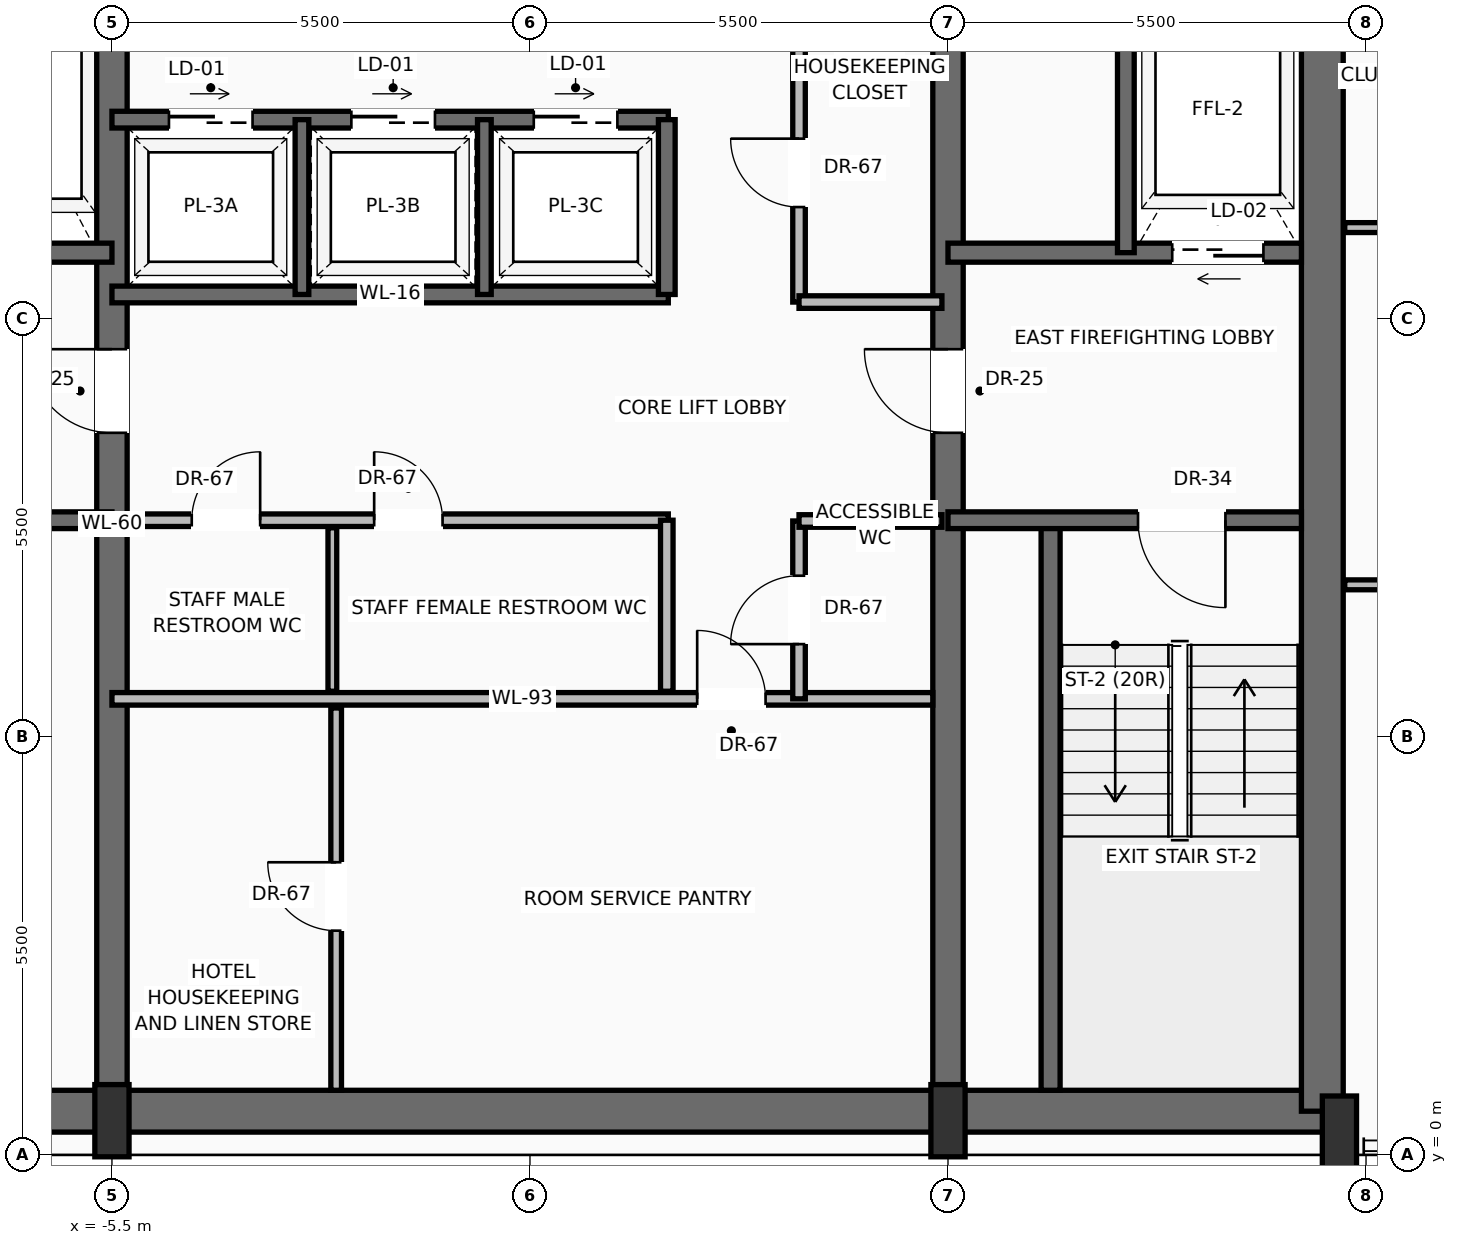
"""IFC4 building model, lengths in metres.
Left out: names, types, materials, properties, quantities, classifications, styles, units other than length and angle.
Written with IfcOpenShell. Run it as: python <this file> out.ifc"""

import sys

from ifc_helpers import new_model, si_unit, direction, frame, frame_2d, origin, origin_2d, place, context, subcontext, project, spatial, rectangle, extrude, source, transform, mapped, element, fill, save


model = new_model("IFC4")
c1 = context("Model", 3, precision=1e-05, world=origin(), true_north=direction((0.0, 1.0)))
c2 = subcontext(c1, "Body", "Model", "MODEL_VIEW")
j1 = project(units=[si_unit("LENGTHUNIT", "METRE"), si_unit("PLANEANGLEUNIT", "RADIAN")], contexts=[c1])
p1 = place(None, origin())
s1 = spatial("IfcSite", under=j1, at=p1, CompositionType="ELEMENT")
p2 = place(p1, origin())
s2 = spatial("IfcBuilding", under=s1, at=p2, CompositionType="ELEMENT")
p3 = place(p2, frame((0.0, 0.0, 233.8)))
s3 = spatial("IfcBuildingStorey", under=s2, at=p3, CompositionType="ELEMENT", Elevation=233.8)
p4 = place(p3, frame((-10.65, 0.575, 0.0), z_axis=(0.0, 0.0, 1.0), x_axis=(1.0, 0.0, 0.0)))
e1 = element("IfcWall", 1, at=p4, inside=s3, PredefinedType="SHEAR", context=c2, shape_type="SweptSolid", body=[
    extrude(rectangle(XDim=21.3, YDim=0.55, at=frame_2d((10.65, 0.0))), origin(), (0.0, 0.0, 1.0), 3.24),
])
p5 = place(p3, frame((10.425, 0.575, 0.0), z_axis=(0.0, 0.0, 1.0), x_axis=(0.0, 1.0, 0.0)))
e2 = element("IfcWall", 2, at=p5, inside=s3, PredefinedType="SHEAR", context=c2, shape_type="SweptSolid", body=[
    extrude(rectangle(XDim=15.45, YDim=0.55, at=frame_2d((7.725, 0.0))), origin(), (0.0, 0.0, 1.0), 3.24),
])
p6 = place(p3, frame((-5.5, 0.575, 0.0), z_axis=(0.0, 0.0, 1.0), x_axis=(0.0, 1.0, 0.0)))
e3 = element("IfcWall", 3, at=p6, inside=s3, PredefinedType="SHEAR", context=c2, shape_type="SweptSolid", body=[
    extrude(rectangle(XDim=15.45, YDim=0.4, at=frame_2d((7.725, 0.0))), origin(), (0.0, 0.0, 1.0), 3.24),
])
p7 = place(p6, frame((8.925, 0.0, 0.0)))
e4 = element("IfcOpeningElement", 4, at=p7, cuts=e3, PredefinedType="OPENING", context=c2, shape_type="SweptSolid", body=[
    extrude(rectangle(XDim=1.1, YDim=2.2, at=frame_2d((0.55, 1.1))), frame((0.0, 0.21, 0.0), z_axis=(0.0, -1.0, 0.0), x_axis=(1.0, 0.0, 0.0)), (0.0, 0.0, 1.0), 0.42),
])
p8 = place(p3, frame((5.5, 0.575, 0.0), z_axis=(0.0, 0.0, 1.0), x_axis=(0.0, 1.0, 0.0)))
e5 = element("IfcWall", 5, at=p8, inside=s3, PredefinedType="SHEAR", context=c2, shape_type="SweptSolid", body=[
    extrude(rectangle(XDim=15.45, YDim=0.4, at=frame_2d((7.725, 0.0))), origin(), (0.0, 0.0, 1.0), 3.24),
])
p9 = place(p8, frame((8.925, 0.0, 0.0)))
e6 = element("IfcOpeningElement", 6, at=p9, cuts=e5, PredefinedType="OPENING", context=c2, shape_type="SweptSolid", body=[
    extrude(rectangle(XDim=1.1, YDim=2.2, at=frame_2d((0.55, 1.1))), frame((0.0, 0.21, 0.0), z_axis=(0.0, -1.0, 0.0), x_axis=(1.0, 0.0, 0.0)), (0.0, 0.0, 1.0), 0.42),
])
m1 = source(origin(), c2, "Body", "SweptSolid", [
    extrude(rectangle(XDim=0.45, YDim=0.95, at=origin_2d()), origin(), (0.0, 0.0, 1.0), 3.45),
])
for number, where, z_axis, x_axis in (
    (7, (-5.5, 0.45, 0.0), (0.0, 0.0, 1.0), (1.0, 0.0, 0.0)),
    (8, (5.5, 0.45, 0.0), (0.0, 0.0, 1.0), (1.0, 0.0, 0.0)),
    (9, (10.65, 0.3, 0.0), (0.0, 0.0, 1.0), (1.0, 0.0, 0.0)),
):
    element("IfcColumn", number, at=place(p3, frame(where, z_axis=z_axis, x_axis=x_axis)), inside=s3, PredefinedType="PILASTER", context=c2, shape_type="MappedRepresentation", body=[
        mapped(m1, transform((0.0, 0.0, 0.0), scale=1.0)),
    ])
p10 = place(p3, frame((-5.5, 8.35, 0.0), z_axis=(0.0, 0.0, 1.0), x_axis=(-1.0, 0.0, 0.0)))
e10 = element("IfcWall", 10, at=p10, inside=s3, PredefinedType="SOLIDWALL", context=c2, shape_type="SweptSolid", body=[
    extrude(rectangle(XDim=4.65, YDim=0.22, at=frame_2d((2.325, 0.0))), origin(), (0.0, 0.0, 1.0), 3.24),
])
p11 = place(p10, frame((2.5, 0.0, 0.0)))
e11 = element("IfcOpeningElement", 11, at=p11, cuts=e10, PredefinedType="OPENING", context=c2, shape_type="SweptSolid", body=[
    extrude(rectangle(XDim=1.15, YDim=2.2, at=frame_2d((0.575, 1.1))), frame((0.0, 0.12, 0.0), z_axis=(0.0, -1.0, 0.0), x_axis=(1.0, 0.0, 0.0)), (0.0, 0.0, 1.0), 0.24),
])
p12 = place(p3, frame((-5.5, 11.87, 0.0), z_axis=(0.0, 0.0, 1.0), x_axis=(-1.0, 0.0, 0.0)))
e12 = element("IfcWall", 12, at=p12, inside=s3, PredefinedType="SOLIDWALL", context=c2, shape_type="SweptSolid", body=[
    extrude(rectangle(XDim=4.65, YDim=0.25, at=frame_2d((2.325, 0.0))), origin(), (0.0, 0.0, 1.0), 3.24),
])
p13 = place(p12, frame((2.95, 0.0, 0.0)))
e13 = element("IfcOpeningElement", 13, at=p13, cuts=e12, PredefinedType="OPENING", context=c2, shape_type="SweptSolid", body=[
    extrude(rectangle(XDim=1.2, YDim=2.25, at=frame_2d((0.6, 1.125))), frame((0.0, 0.135, 0.0), z_axis=(0.0, -1.0, 0.0), x_axis=(1.0, 0.0, 0.0)), (0.0, 0.0, 1.0), 0.27),
])
p14 = place(p3, frame((6.85, 0.85, 0.0), z_axis=(0.0, 0.0, 1.0), x_axis=(0.0, 1.0, 0.0)))
e14 = element("IfcWall", 14, at=p14, inside=s3, PredefinedType="SOLIDWALL", context=c2, shape_type="SweptSolid", body=[
    extrude(rectangle(XDim=7.5, YDim=0.25, at=frame_2d((3.75, 0.0))), origin(), (0.0, 0.0, 1.0), 3.24),
])
p15 = place(p3, frame((10.15, 8.35, 0.0), z_axis=(0.0, 0.0, 1.0), x_axis=(-1.0, 0.0, 0.0)))
e15 = element("IfcWall", 15, at=p15, inside=s3, PredefinedType="SOLIDWALL", context=c2, shape_type="SweptSolid", body=[
    extrude(rectangle(XDim=4.65, YDim=0.22, at=frame_2d((2.325, 0.0))), origin(), (0.0, 0.0, 1.0), 3.24),
])
p16 = place(p15, frame((1.0, 0.0, 0.0)))
e16 = element("IfcOpeningElement", 16, at=p16, cuts=e15, PredefinedType="OPENING", context=c2, shape_type="SweptSolid", body=[
    extrude(rectangle(XDim=1.15, YDim=2.2, at=frame_2d((0.575, 1.1))), frame((0.0, 0.12, 0.0), z_axis=(0.0, -1.0, 0.0), x_axis=(1.0, 0.0, 0.0)), (0.0, 0.0, 1.0), 0.24),
])
p17 = place(p3, frame((10.15, 11.87, 0.0), z_axis=(0.0, 0.0, 1.0), x_axis=(-1.0, 0.0, 0.0)))
e17 = element("IfcWall", 17, at=p17, inside=s3, PredefinedType="SOLIDWALL", context=c2, shape_type="SweptSolid", body=[
    extrude(rectangle(XDim=4.65, YDim=0.25, at=frame_2d((2.325, 0.0))), origin(), (0.0, 0.0, 1.0), 3.24),
])
p18 = place(p17, frame((0.5, 0.0, 0.0)))
e18 = element("IfcOpeningElement", 18, at=p18, cuts=e17, PredefinedType="OPENING", context=c2, shape_type="SweptSolid", body=[
    extrude(rectangle(XDim=1.2, YDim=2.25, at=frame_2d((0.6, 1.125))), frame((0.0, 0.135, 0.0), z_axis=(0.0, -1.0, 0.0), x_axis=(1.0, 0.0, 0.0)), (0.0, 0.0, 1.0), 0.27),
])
p19 = place(p3, frame((7.84, 11.87, 0.0), z_axis=(0.0, 0.0, 1.0), x_axis=(0.0, 1.0, 0.0)))
e19 = element("IfcWall", 19, at=p19, inside=s3, PredefinedType="SOLIDWALL", context=c2, shape_type="SweptSolid", body=[
    extrude(rectangle(XDim=3.88, YDim=0.22, at=frame_2d((1.94, 0.0))), origin(), (0.0, 0.0, 1.0), 3.24),
])
p20 = place(p3, frame((-5.5, 6.0, 0.0), z_axis=(0.0, 0.0, 1.0), x_axis=(1.0, 0.0, 0.0)))
e20 = element("IfcWall", 20, at=p20, inside=s3, PredefinedType="PARTITIONING", context=c2, shape_type="SweptSolid", body=[
    extrude(rectangle(XDim=10.8, YDim=0.165, at=frame_2d((5.4, 0.0))), origin(), (0.0, 0.0, 1.0), 3.232),
])
p21 = place(p20, frame((7.7, 0.0, 0.0)))
e21 = element("IfcOpeningElement", 21, at=p21, cuts=e20, PredefinedType="OPENING", context=c2, shape_type="SweptSolid", body=[
    extrude(rectangle(XDim=0.9, YDim=2.1, at=frame_2d((0.45, 1.05))), frame((0.0, 0.093, 0.0), z_axis=(0.0, -1.0, 0.0), x_axis=(1.0, 0.0, 0.0)), (0.0, 0.0, 1.0), 0.185),
])
p22 = place(p3, frame((-2.55, 0.85, 0.0), z_axis=(0.0, 0.0, 1.0), x_axis=(0.0, 1.0, 0.0)))
e22 = element("IfcWall", 22, at=p22, inside=s3, PredefinedType="PARTITIONING", context=c2, shape_type="SweptSolid", body=[
    extrude(rectangle(XDim=5.03, YDim=0.14, at=frame_2d((2.515, 0.0))), origin(), (0.0, 0.0, 1.0), 3.232),
])
p23 = place(p22, frame((2.1, 0.0, 0.0)))
e23 = element("IfcOpeningElement", 23, at=p23, cuts=e22, PredefinedType="OPENING", context=c2, shape_type="SweptSolid", body=[
    extrude(rectangle(XDim=0.9, YDim=2.1, at=frame_2d((0.45, 1.05))), frame((0.0, 0.08, 0.0), z_axis=(0.0, -1.0, 0.0), x_axis=(1.0, 0.0, 0.0)), (0.0, 0.0, 1.0), 0.16),
])
p24 = place(p3, frame((3.54, 6.0, 0.0), z_axis=(0.0, 0.0, 1.0), x_axis=(0.0, 1.0, 0.0)))
e24 = element("IfcWall", 24, at=p24, inside=s3, PredefinedType="PARTITIONING", context=c2, shape_type="SweptSolid", body=[
    extrude(rectangle(XDim=2.34, YDim=0.165, at=frame_2d((1.17, 0.0))), origin(), (0.0, 0.0, 1.0), 3.232),
])
p25 = place(p24, frame((0.72, 0.0, 0.0)))
e25 = element("IfcOpeningElement", 25, at=p25, cuts=e24, PredefinedType="OPENING", context=c2, shape_type="SweptSolid", body=[
    extrude(rectangle(XDim=0.9, YDim=2.1, at=frame_2d((0.45, 1.05))), frame((0.0, 0.093, 0.0), z_axis=(0.0, -1.0, 0.0), x_axis=(1.0, 0.0, 0.0)), (0.0, 0.0, 1.0), 0.185),
])
p26 = place(p3, frame((3.54, 8.34, 0.0), z_axis=(0.0, 0.0, 1.0), x_axis=(1.0, 0.0, 0.0)))
e26 = element("IfcWall", 26, at=p26, inside=s3, PredefinedType="PARTITIONING", context=c2, shape_type="SweptSolid", body=[
    extrude(rectangle(XDim=1.88, YDim=0.165, at=frame_2d((0.94, 0.0))), origin(), (0.0, 0.0, 1.0), 3.232),
])
p27 = place(p3, frame((-5.3, 8.35, 0.0), z_axis=(0.0, 0.0, 1.0), x_axis=(1.0, 0.0, 0.0)))
e27 = element("IfcWall", 27, at=p27, inside=s3, PredefinedType="PARTITIONING", context=c2, shape_type="SweptSolid", body=[
    extrude(rectangle(XDim=7.12, YDim=0.165, at=frame_2d((3.56, 0.0))), origin(), (0.0, 0.0, 1.0), 3.232),
])
p28 = place(p27, frame((0.85, 0.0, 0.0)))
e28 = element("IfcOpeningElement", 28, at=p28, cuts=e27, PredefinedType="OPENING", context=c2, shape_type="SweptSolid", body=[
    extrude(rectangle(XDim=0.9, YDim=2.1, at=frame_2d((0.45, 1.05))), frame((0.0, 0.093, 0.0), z_axis=(0.0, -1.0, 0.0), x_axis=(1.0, 0.0, 0.0)), (0.0, 0.0, 1.0), 0.185),
])
p29 = place(p27, frame((3.25, 0.0, 0.0)))
e29 = element("IfcOpeningElement", 29, at=p29, cuts=e27, PredefinedType="OPENING", context=c2, shape_type="SweptSolid", body=[
    extrude(rectangle(XDim=0.9, YDim=2.1, at=frame_2d((0.45, 1.05))), frame((0.0, 0.093, 0.0), z_axis=(0.0, -1.0, 0.0), x_axis=(1.0, 0.0, 0.0)), (0.0, 0.0, 1.0), 0.185),
])
p30 = place(p3, frame((1.8, 6.1, 0.0), z_axis=(0.0, 0.0, 1.0), x_axis=(0.0, 1.0, 0.0)))
e30 = element("IfcWall", 30, at=p30, inside=s3, PredefinedType="PARTITIONING", context=c2, shape_type="SweptSolid", body=[
    extrude(rectangle(XDim=2.25, YDim=0.165, at=frame_2d((1.125, 0.0))), origin(), (0.0, 0.0, 1.0), 3.232),
])
p31 = place(p3, frame((-2.6, 6.1, 0.0), z_axis=(0.0, 0.0, 1.0), x_axis=(0.0, 1.0, 0.0)))
e31 = element("IfcWall", 31, at=p31, inside=s3, PredefinedType="PARTITIONING", context=c2, shape_type="SweptSolid", body=[
    extrude(rectangle(XDim=2.15, YDim=0.115, at=frame_2d((1.075, 0.0))), origin(), (0.0, 0.0, 1.0), 3.232),
])
p32 = place(p3, frame((-5.5, 11.32, 0.0), z_axis=(0.0, 0.0, 1.0), x_axis=(1.0, 0.0, 0.0)))
e32 = element("IfcWall", 32, at=p32, inside=s3, PredefinedType="SOLIDWALL", context=c2, shape_type="SweptSolid", body=[
    extrude(rectangle(XDim=7.32, YDim=0.22, at=frame_2d((3.66, 0.0))), origin(), (0.0, 0.0, 1.0), 3.24),
])
p33 = place(p3, frame((-5.5, 13.62, 0.0), z_axis=(0.0, 0.0, 1.0), x_axis=(1.0, 0.0, 0.0)))
e33 = element("IfcWall", 33, at=p33, inside=s3, PredefinedType="SOLIDWALL", context=c2, shape_type="SweptSolid", body=[
    extrude(rectangle(XDim=7.32, YDim=0.22, at=frame_2d((3.66, 0.0))), origin(), (0.0, 0.0, 1.0), 3.24),
])
p34 = place(p33, frame((0.75, 0.0, 0.0)))
e34 = element("IfcOpeningElement", 34, at=p34, cuts=e33, PredefinedType="OPENING", context=c2, shape_type="SweptSolid", body=[
    extrude(rectangle(XDim=1.1, YDim=2.2, at=frame_2d((0.55, 1.1))), frame((0.0, 0.12, 0.0), z_axis=(0.0, -1.0, 0.0), x_axis=(1.0, 0.0, 0.0)), (0.0, 0.0, 1.0), 0.24),
])
p35 = place(p33, frame((3.15, 0.0, 0.0)))
e35 = element("IfcOpeningElement", 35, at=p35, cuts=e33, PredefinedType="OPENING", context=c2, shape_type="SweptSolid", body=[
    extrude(rectangle(XDim=1.1, YDim=2.2, at=frame_2d((0.55, 1.1))), frame((0.0, 0.12, 0.0), z_axis=(0.0, -1.0, 0.0), x_axis=(1.0, 0.0, 0.0)), (0.0, 0.0, 1.0), 0.24),
])
p36 = place(p33, frame((5.55, 0.0, 0.0)))
e36 = element("IfcOpeningElement", 36, at=p36, cuts=e33, PredefinedType="OPENING", context=c2, shape_type="SweptSolid", body=[
    extrude(rectangle(XDim=1.1, YDim=2.2, at=frame_2d((0.55, 1.1))), frame((0.0, 0.12, 0.0), z_axis=(0.0, -1.0, 0.0), x_axis=(1.0, 0.0, 0.0)), (0.0, 0.0, 1.0), 0.24),
])
p37 = place(p3, frame((1.8, 11.32, 0.0), z_axis=(0.0, 0.0, 1.0), x_axis=(0.0, 1.0, 0.0)))
e37 = element("IfcWall", 37, at=p37, inside=s3, PredefinedType="SOLIDWALL", context=c2, shape_type="SweptSolid", body=[
    extrude(rectangle(XDim=2.3, YDim=0.22, at=frame_2d((1.15, 0.0))), origin(), (0.0, 0.0, 1.0), 3.24),
])
for number, where, z_axis, x_axis in (
    (38, (-3.0, 11.32, 0.0), (0.0, 0.0, 1.0), (0.0, 1.0, 0.0)),
    (39, (-0.6, 11.32, 0.0), (0.0, 0.0, 1.0), (0.0, 1.0, 0.0)),
):
    element("IfcWall", number, at=place(p3, frame(where, z_axis=z_axis, x_axis=x_axis)), inside=s3, PredefinedType="SOLIDWALL", context=c2, shape_type="SweptSolid", body=[
        extrude(rectangle(XDim=2.3, YDim=0.18, at=frame_2d((1.15, 0.0))), origin(), (0.0, 0.0, 1.0), 3.24),
    ])
p38 = place(p3, frame((3.54, 11.22, 0.0), z_axis=(0.0, 0.0, 1.0), x_axis=(0.0, 1.0, 0.0)))
e40 = element("IfcWall", 40, at=p38, inside=s3, PredefinedType="PARTITIONING", context=c2, shape_type="SweptSolid", body=[
    extrude(rectangle(XDim=4.53, YDim=0.165, at=frame_2d((2.265, 0.0))), origin(), (0.0, 0.0, 1.0), 3.232),
])
p39 = place(p38, frame((1.25, 0.0, 0.0)))
e41 = element("IfcOpeningElement", 41, at=p39, cuts=e40, PredefinedType="OPENING", context=c2, shape_type="SweptSolid", body=[
    extrude(rectangle(XDim=0.9, YDim=2.1, at=frame_2d((0.45, 1.05))), frame((0.0, 0.093, 0.0), z_axis=(0.0, -1.0, 0.0), x_axis=(1.0, 0.0, 0.0)), (0.0, 0.0, 1.0), 0.185),
])
p40 = place(p3, frame((3.54, 11.22, 0.0), z_axis=(0.0, 0.0, 1.0), x_axis=(1.0, 0.0, 0.0)))
e42 = element("IfcWall", 42, at=p40, inside=s3, PredefinedType="PARTITIONING", context=c2, shape_type="SweptSolid", body=[
    extrude(rectangle(XDim=1.88, YDim=0.165, at=frame_2d((0.94, 0.0))), origin(), (0.0, 0.0, 1.0), 3.232),
])
p41 = place(p3, frame((10.72, 7.5, 0.0), z_axis=(0.0, 0.0, 1.0), x_axis=(1.0, 0.0, 0.0)))
e43 = element("IfcWall", 43, at=p41, inside=s3, PredefinedType="PARTITIONING", context=c2, shape_type="SweptSolid", body=[
    extrude(rectangle(XDim=13.307, YDim=0.13, at=frame_2d((6.654, 0.0))), origin(), (0.0, 0.0, 1.0), 3.232),
])
p42 = place(p41, frame((5.547, 0.0, 0.0)))
e44 = element("IfcOpeningElement", 44, at=p42, cuts=e43, PredefinedType="OPENING", context=c2, shape_type="SweptSolid", body=[
    extrude(rectangle(XDim=0.95, YDim=2.2, at=frame_2d((0.475, 1.1))), frame((0.0, 0.075, 0.0), z_axis=(0.0, -1.0, 0.0), x_axis=(1.0, 0.0, 0.0)), (0.0, 0.0, 1.0), 0.15),
])
p43 = place(p3, frame((10.72, 12.2, 0.0), z_axis=(0.0, 0.0, 1.0), x_axis=(1.0, 0.0, 0.0)))
e45 = element("IfcWall", 45, at=p43, inside=s3, PredefinedType="PARTITIONING", context=c2, shape_type="SweptSolid", body=[
    extrude(rectangle(XDim=10.394, YDim=0.13, at=frame_2d((5.197, 0.0))), origin(), (0.0, 0.0, 1.0), 3.232),
])
p44 = place(p43, frame((4.236, 0.0, 0.0)))
e46 = element("IfcOpeningElement", 46, at=p44, cuts=e45, PredefinedType="OPENING", context=c2, shape_type="SweptSolid", body=[
    extrude(rectangle(XDim=0.95, YDim=2.2, at=frame_2d((0.475, 1.1))), frame((0.0, 0.075, 0.0), z_axis=(0.0, -1.0, 0.0), x_axis=(1.0, 0.0, 0.0)), (0.0, 0.0, 1.0), 0.15),
])
m2 = source(origin(), c2, "Body", "SweptSolid", [
    extrude(rectangle(XDim=1.1, YDim=2.2, at=frame_2d((0.55, 1.1))), frame((0.0, 0.025, 0.0), z_axis=(0.0, -1.0, 0.0), x_axis=(1.0, 0.0, 0.0)), (0.0, 0.0, 1.0), 0.05),
])
p45 = place(p7, origin())
e47 = element("IfcDoor", 47, at=p45, inside=s3, OperationType="SINGLE_SWING_RIGHT", PredefinedType="DOOR", context=c2, shape_type="MappedRepresentation", body=[
    mapped(m2, transform((0.0, 0.0, 0.0), scale=1.0)),
])
fill(e4, e47)
m3 = source(origin(), c2, "Body", "SweptSolid", [
    extrude(rectangle(XDim=1.15, YDim=2.2, at=frame_2d((0.575, 1.1))), frame((0.0, 0.025, 0.0), z_axis=(0.0, -1.0, 0.0), x_axis=(1.0, 0.0, 0.0)), (0.0, 0.0, 1.0), 0.05),
])
p46 = place(p16, origin())
e48 = element("IfcDoor", 48, at=p46, inside=s3, OperationType="SINGLE_SWING_LEFT", PredefinedType="DOOR", context=c2, shape_type="MappedRepresentation", body=[
    mapped(m3, transform((0.0, 0.0, 0.0), scale=1.0)),
])
fill(e16, e48)
p47 = place(p9, origin())
e49 = element("IfcDoor", 49, at=p47, inside=s3, OperationType="SINGLE_SWING_RIGHT", PredefinedType="DOOR", context=c2, shape_type="MappedRepresentation", body=[
    mapped(m2, transform((0.0, 0.0, 0.0), scale=1.0)),
])
fill(e6, e49)
m4 = source(origin(), c2, "Body", "SweptSolid", [
    extrude(rectangle(XDim=1.2, YDim=2.25, at=frame_2d((0.6, 1.125))), frame((0.0, 0.025, 0.0), z_axis=(0.0, -1.0, 0.0), x_axis=(1.0, 0.0, 0.0)), (0.0, 0.0, 1.0), 0.05),
])
p48 = place(p18, origin())
e50 = element("IfcDoor", 50, at=p48, inside=s3, OperationType="SLIDING_TO_RIGHT", PredefinedType="DOOR", context=c2, shape_type="MappedRepresentation", body=[
    mapped(m4, transform((0.0, 0.0, 0.0), scale=1.0)),
])
fill(e18, e50)
m5 = source(origin(), c2, "Body", "SweptSolid", [
    extrude(rectangle(XDim=0.9, YDim=2.1, at=frame_2d((0.45, 1.05))), frame((0.0, 0.025, 0.0), z_axis=(0.0, -1.0, 0.0), x_axis=(1.0, 0.0, 0.0)), (0.0, 0.0, 1.0), 0.05),
])
p49 = place(p21, origin())
e51 = element("IfcDoor", 51, at=p49, inside=s3, OperationType="SINGLE_SWING_LEFT", PredefinedType="DOOR", context=c2, shape_type="MappedRepresentation", body=[
    mapped(m5, transform((0.0, 0.0, 0.0), scale=1.0)),
])
fill(e21, e51)
p50 = place(p23, origin())
e52 = element("IfcDoor", 52, at=p50, inside=s3, OperationType="SINGLE_SWING_RIGHT", PredefinedType="DOOR", context=c2, shape_type="MappedRepresentation", body=[
    mapped(m5, transform((0.0, 0.0, 0.0), scale=1.0)),
])
fill(e23, e52)
p51 = place(p25, origin())
e53 = element("IfcDoor", 53, at=p51, inside=s3, OperationType="SINGLE_SWING_LEFT", PredefinedType="DOOR", context=c2, shape_type="MappedRepresentation", body=[
    mapped(m5, transform((0.0, 0.0, 0.0), scale=1.0)),
])
fill(e25, e53)
p52 = place(p28, origin())
e54 = element("IfcDoor", 54, at=p52, inside=s3, OperationType="SINGLE_SWING_RIGHT", PredefinedType="DOOR", context=c2, shape_type="MappedRepresentation", body=[
    mapped(m5, transform((0.0, 0.0, 0.0), scale=1.0)),
])
fill(e28, e54)
p53 = place(p29, origin())
e55 = element("IfcDoor", 55, at=p53, inside=s3, OperationType="SINGLE_SWING_LEFT", PredefinedType="DOOR", context=c2, shape_type="MappedRepresentation", body=[
    mapped(m5, transform((0.0, 0.0, 0.0), scale=1.0)),
])
fill(e29, e55)
m6 = source(origin(), c2, "Body", "SweptSolid", [
    extrude(rectangle(XDim=1.1, YDim=2.2, at=frame_2d((0.55, 1.1))), frame((0.0, 0.025, 0.0), z_axis=(0.0, -1.0, 0.0), x_axis=(1.0, 0.0, 0.0)), (0.0, 0.0, 1.0), 0.05),
])
p54 = place(p34, origin())
e56 = element("IfcDoor", 56, at=p54, inside=s3, OperationType="SLIDING_TO_RIGHT", PredefinedType="DOOR", context=c2, shape_type="MappedRepresentation", body=[
    mapped(m6, transform((0.0, 0.0, 0.0), scale=1.0)),
])
fill(e34, e56)
p55 = place(p35, origin())
e57 = element("IfcDoor", 57, at=p55, inside=s3, OperationType="SLIDING_TO_RIGHT", PredefinedType="DOOR", context=c2, shape_type="MappedRepresentation", body=[
    mapped(m6, transform((0.0, 0.0, 0.0), scale=1.0)),
])
fill(e35, e57)
p56 = place(p36, origin())
e58 = element("IfcDoor", 58, at=p56, inside=s3, OperationType="SLIDING_TO_RIGHT", PredefinedType="DOOR", context=c2, shape_type="MappedRepresentation", body=[
    mapped(m6, transform((0.0, 0.0, 0.0), scale=1.0)),
])
fill(e36, e58)
p57 = place(p39, origin())
e59 = element("IfcDoor", 59, at=p57, inside=s3, OperationType="SINGLE_SWING_RIGHT", PredefinedType="DOOR", context=c2, shape_type="MappedRepresentation", body=[
    mapped(m5, transform((0.0, 0.0, 0.0), scale=1.0)),
])
fill(e41, e59)
save(model, sys.argv[1])
